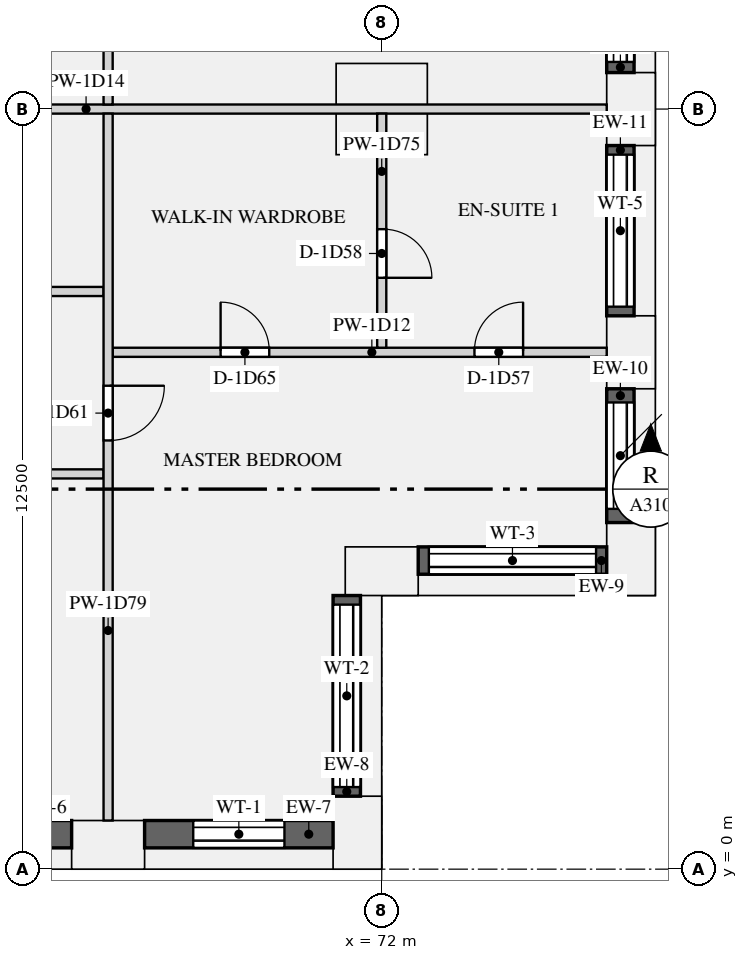
"""IFC4 building model, lengths in metres.
Left out: names, types, materials, properties, quantities, classifications, styles, units other than length and angle.
Written with IfcOpenShell. Run it as: python <this file> out.ifc"""

import sys

from ifc_helpers import new_model, si_unit, direction, frame, frame_2d, origin, origin_2d, place, context, subcontext, project, spatial, rectangle, extrude, element, fill, save


model = new_model("IFC4")
c1 = context("Model", 3, precision=1e-05, world=origin(), true_north=direction((0.0, 1.0)))
c2 = subcontext(c1, "Body", "Model", "MODEL_VIEW")
j1 = project(units=[si_unit("LENGTHUNIT", "METRE"), si_unit("PLANEANGLEUNIT", "RADIAN")], contexts=[c1])
p1 = place(None, origin())
s1 = spatial("IfcSite", under=j1, at=p1, CompositionType="ELEMENT")
p2 = place(p1, origin())
s2 = spatial("IfcBuilding", under=s1, at=p2, CompositionType="ELEMENT")
p3 = place(p2, frame((0.0, 0.0, 47.85)))
s3 = spatial("IfcBuildingStorey", under=s2, at=p3, CompositionType="ELEMENT", Elevation=47.85)
for number, where, z_axis, x_axis in (
    (1, (67.5, 0.4, 0.0), (0.0, 0.0, 1.0), (1.0, 0.0, 0.0)),
    (2, (71.6, 0.6, 0.0), (0.0, 0.0, 1.0), (0.0, 1.0, 0.0)),
    (3, (72.0, 4.9, 0.0), (0.0, 0.0, 1.0), (1.0, 0.0, 0.0)),
    (4, (76.1, 5.1, 0.0), (0.0, 0.0, 1.0), (0.0, 1.0, 0.0)),
    (5, (76.1, 8.5, 0.0), (0.0, 0.0, 1.0), (0.0, 1.0, 0.0)),
    (6, (76.1, 12.5, 0.0), (0.0, 0.0, 1.0), (0.0, 1.0, 0.0)),
):
    element("IfcColumn", number, at=place(p3, frame(where, z_axis=z_axis, x_axis=x_axis)), inside=s3, PredefinedType="USERDEFINED", context=c2, shape_type="SweptSolid", body=[
        extrude(rectangle(XDim=1.2, YDim=0.8, at=origin_2d()), origin(), (0.0, 0.0, 1.0), 3.15),
    ])
p4 = place(p3, frame((72.0, 12.5, 0.0), z_axis=(0.0, 0.0, 1.0), x_axis=(1.0, 0.0, 0.0)))
e7 = element("IfcColumn", 7, at=p4, inside=s3, PredefinedType="COLUMN", context=c2, shape_type="SweptSolid", body=[
    extrude(rectangle(XDim=1.5, YDim=1.5, at=origin_2d()), origin(), (0.0, 0.0, 1.0), 3.15),
])
p5 = place(p3, frame((63.6, 0.575, 0.9), z_axis=(0.0, 0.0, 1.0), x_axis=(1.0, 0.0, 0.0)))
e8 = element("IfcWall", 8, at=p5, inside=s3, PredefinedType="SOLIDWALL", context=c2, shape_type="SweptSolid", body=[
    extrude(rectangle(XDim=3.3, YDim=0.45, at=frame_2d((1.65, 0.0))), origin(), (0.0, 0.0, 1.0), 1.93),
])
p6 = place(p5, frame((0.9, 0.0, 0.15)))
e9 = element("IfcOpeningElement", 9, at=p6, cuts=e8, PredefinedType="OPENING", context=c2, shape_type="SweptSolid", body=[
    extrude(rectangle(XDim=1.5, YDim=1.5, at=frame_2d((0.75, 0.75))), frame((0.0, 0.235, 0.0), z_axis=(0.0, -1.0, 0.0), x_axis=(1.0, 0.0, 0.0)), (0.0, 0.0, 1.0), 0.47),
])
p7 = place(p3, frame((68.1, 0.575, 0.9), z_axis=(0.0, 0.0, 1.0), x_axis=(1.0, 0.0, 0.0)))
e10 = element("IfcWall", 10, at=p7, inside=s3, PredefinedType="SOLIDWALL", context=c2, shape_type="SweptSolid", body=[
    extrude(rectangle(XDim=3.1, YDim=0.45, at=frame_2d((1.55, 0.0))), origin(), (0.0, 0.0, 1.0), 1.93),
])
p8 = place(p7, frame((0.8, 0.0, 0.15)))
e11 = element("IfcOpeningElement", 11, at=p8, cuts=e10, PredefinedType="OPENING", context=c2, shape_type="SweptSolid", body=[
    extrude(rectangle(XDim=1.5, YDim=1.5, at=frame_2d((0.75, 0.75))), frame((0.0, 0.235, 0.0), z_axis=(0.0, -1.0, 0.0), x_axis=(1.0, 0.0, 0.0)), (0.0, 0.0, 1.0), 0.47),
])
p9 = place(p3, frame((71.425, 1.2, 0.9), z_axis=(0.0, 0.0, 1.0), x_axis=(0.0, 1.0, 0.0)))
e12 = element("IfcWall", 12, at=p9, inside=s3, PredefinedType="SOLIDWALL", context=c2, shape_type="SweptSolid", body=[
    extrude(rectangle(XDim=3.3, YDim=0.45, at=frame_2d((1.65, 0.0))), origin(), (0.0, 0.0, 1.0), 1.93),
])
p10 = place(p9, frame((0.15, 0.0, 0.15)))
e13 = element("IfcOpeningElement", 13, at=p10, cuts=e12, PredefinedType="OPENING", context=c2, shape_type="SweptSolid", body=[
    extrude(rectangle(XDim=3.0, YDim=1.5, at=frame_2d((1.5, 0.75))), frame((0.0, 0.235, 0.0), z_axis=(0.0, -1.0, 0.0), x_axis=(1.0, 0.0, 0.0)), (0.0, 0.0, 1.0), 0.47),
])
p11 = place(p3, frame((72.6, 5.075, 0.9), z_axis=(0.0, 0.0, 1.0), x_axis=(1.0, 0.0, 0.0)))
e14 = element("IfcWall", 14, at=p11, inside=s3, PredefinedType="SOLIDWALL", context=c2, shape_type="SweptSolid", body=[
    extrude(rectangle(XDim=3.1, YDim=0.45, at=frame_2d((1.55, 0.0))), origin(), (0.0, 0.0, 1.0), 1.93),
])
p12 = place(p11, frame((0.175, 0.0, 0.15)))
e15 = element("IfcOpeningElement", 15, at=p12, cuts=e14, PredefinedType="OPENING", context=c2, shape_type="SweptSolid", body=[
    extrude(rectangle(XDim=2.75, YDim=1.5, at=frame_2d((1.375, 0.75))), frame((0.0, 0.235, 0.0), z_axis=(0.0, -1.0, 0.0), x_axis=(1.0, 0.0, 0.0)), (0.0, 0.0, 1.0), 0.47),
])
p13 = place(p3, frame((75.925, 5.7, 0.9), z_axis=(0.0, 0.0, 1.0), x_axis=(0.0, 1.0, 0.0)))
e16 = element("IfcWall", 16, at=p13, inside=s3, PredefinedType="SOLIDWALL", context=c2, shape_type="SweptSolid", body=[
    extrude(rectangle(XDim=2.2, YDim=0.45, at=frame_2d((1.1, 0.0))), origin(), (0.0, 0.0, 1.0), 1.93),
])
p14 = place(p13, frame((0.225, 0.0, 0.15)))
e17 = element("IfcOpeningElement", 17, at=p14, cuts=e16, PredefinedType="OPENING", context=c2, shape_type="SweptSolid", body=[
    extrude(rectangle(XDim=1.75, YDim=1.5, at=frame_2d((0.875, 0.75))), frame((0.0, 0.235, 0.0), z_axis=(0.0, -1.0, 0.0), x_axis=(1.0, 0.0, 0.0)), (0.0, 0.0, 1.0), 0.47),
])
p15 = place(p3, frame((75.925, 9.1, 0.9), z_axis=(0.0, 0.0, 1.0), x_axis=(0.0, 1.0, 0.0)))
e18 = element("IfcWall", 18, at=p15, inside=s3, PredefinedType="SOLIDWALL", context=c2, shape_type="SweptSolid", body=[
    extrude(rectangle(XDim=2.8, YDim=0.45, at=frame_2d((1.4, 0.0))), origin(), (0.0, 0.0, 1.0), 1.93),
])
p16 = place(p15, frame((0.15, 0.0, 0.15)))
e19 = element("IfcOpeningElement", 19, at=p16, cuts=e18, PredefinedType="OPENING", context=c2, shape_type="SweptSolid", body=[
    extrude(rectangle(XDim=2.5, YDim=1.5, at=frame_2d((1.25, 0.75))), frame((0.0, 0.235, 0.0), z_axis=(0.0, -1.0, 0.0), x_axis=(1.0, 0.0, 0.0)), (0.0, 0.0, 1.0), 0.47),
])
p17 = place(p3, frame((75.925, 13.1, 0.9), z_axis=(0.0, 0.0, 1.0), x_axis=(0.0, 1.0, 0.0)))
e20 = element("IfcWall", 20, at=p17, inside=s3, PredefinedType="SOLIDWALL", context=c2, shape_type="SweptSolid", body=[
    extrude(rectangle(XDim=2.6, YDim=0.45, at=frame_2d((1.3, 0.0))), origin(), (0.0, 0.0, 1.0), 1.93),
])
p18 = place(p17, frame((0.175, 0.0, 0.15)))
e21 = element("IfcOpeningElement", 21, at=p18, cuts=e20, PredefinedType="OPENING", context=c2, shape_type="SweptSolid", body=[
    extrude(rectangle(XDim=2.25, YDim=1.5, at=frame_2d((1.125, 0.75))), frame((0.0, 0.235, 0.0), z_axis=(0.0, -1.0, 0.0), x_axis=(1.0, 0.0, 0.0)), (0.0, 0.0, 1.0), 0.47),
])
p19 = place(p3, frame((67.575, 8.5, 0.0), z_axis=(0.0, 0.0, 1.0), x_axis=(1.0, 0.0, 0.0)))
e22 = element("IfcWall", 22, at=p19, inside=s3, PredefinedType="PARTITIONING", context=c2, shape_type="SweptSolid", body=[
    extrude(rectangle(XDim=8.125, YDim=0.15, at=frame_2d((4.062, 0.0))), origin(), (0.0, 0.0, 1.0), 2.83),
])
p20 = place(p19, frame((5.95, 0.0, 0.0)))
e23 = element("IfcOpeningElement", 23, at=p20, cuts=e22, PredefinedType="OPENING", context=c2, shape_type="SweptSolid", body=[
    extrude(rectangle(XDim=0.8, YDim=2.1, at=frame_2d((0.4, 1.05))), frame((0.0, 0.085, 0.0), z_axis=(0.0, -1.0, 0.0), x_axis=(1.0, 0.0, 0.0)), (0.0, 0.0, 1.0), 0.17),
])
p21 = place(p19, frame((1.775, 0.0, 0.0)))
e24 = element("IfcOpeningElement", 24, at=p21, cuts=e22, PredefinedType="OPENING", context=c2, shape_type="SweptSolid", body=[
    extrude(rectangle(XDim=0.8, YDim=2.1, at=frame_2d((0.4, 1.05))), frame((0.0, 0.085, 0.0), z_axis=(0.0, -1.0, 0.0), x_axis=(1.0, 0.0, 0.0)), (0.0, 0.0, 1.0), 0.17),
])
p22 = place(p3, frame((58.575, 12.5, 0.0), z_axis=(0.0, 0.0, 1.0), x_axis=(1.0, 0.0, 0.0)))
e25 = element("IfcWall", 25, at=p22, inside=s3, PredefinedType="PARTITIONING", context=c2, shape_type="SweptSolid", body=[
    extrude(rectangle(XDim=17.125, YDim=0.15, at=frame_2d((8.562, 0.0))), origin(), (0.0, 0.0, 1.0), 2.83),
])
p23 = place(p3, frame((54.0, 6.5, 0.0), z_axis=(0.0, 0.0, 1.0), x_axis=(1.0, 0.0, 0.0)))
e26 = element("IfcWall", 26, at=p23, inside=s3, PredefinedType="PARTITIONING", context=c2, shape_type="SweptSolid", body=[
    extrude(rectangle(XDim=13.425, YDim=0.15, at=frame_2d((6.712, 0.0))), origin(), (0.0, 0.0, 1.0), 2.83),
])
p24 = place(p23, frame((1.8, 0.0, 0.0)))
e27 = element("IfcOpeningElement", 27, at=p24, cuts=e26, PredefinedType="OPENING", context=c2, shape_type="SweptSolid", body=[
    extrude(rectangle(XDim=0.9, YDim=2.1, at=frame_2d((0.45, 1.05))), frame((0.0, 0.085, 0.0), z_axis=(0.0, -1.0, 0.0), x_axis=(1.0, 0.0, 0.0)), (0.0, 0.0, 1.0), 0.17),
])
p25 = place(p23, frame((6.3, 0.0, 0.0)))
e28 = element("IfcOpeningElement", 28, at=p25, cuts=e26, PredefinedType="OPENING", context=c2, shape_type="SweptSolid", body=[
    extrude(rectangle(XDim=0.9, YDim=2.1, at=frame_2d((0.45, 1.05))), frame((0.0, 0.085, 0.0), z_axis=(0.0, -1.0, 0.0), x_axis=(1.0, 0.0, 0.0)), (0.0, 0.0, 1.0), 0.17),
])
p26 = place(p23, frame((10.8, 0.0, 0.0)))
e29 = element("IfcOpeningElement", 29, at=p26, cuts=e26, PredefinedType="OPENING", context=c2, shape_type="SweptSolid", body=[
    extrude(rectangle(XDim=0.9, YDim=2.1, at=frame_2d((0.45, 1.05))), frame((0.0, 0.085, 0.0), z_axis=(0.0, -1.0, 0.0), x_axis=(1.0, 0.0, 0.0)), (0.0, 0.0, 1.0), 0.17),
])
p27 = place(p3, frame((58.425, 9.5, 0.0), z_axis=(0.0, 0.0, 1.0), x_axis=(1.0, 0.0, 0.0)))
e30 = element("IfcWall", 30, at=p27, inside=s3, PredefinedType="PARTITIONING", context=c2, shape_type="SweptSolid", body=[
    extrude(rectangle(XDim=9.0, YDim=0.15, at=frame_2d((4.5, 0.0))), origin(), (0.0, 0.0, 1.0), 2.83),
])
p28 = place(p27, frame((6.375, 0.0, 0.0)))
e31 = element("IfcOpeningElement", 31, at=p28, cuts=e30, PredefinedType="OPENING", context=c2, shape_type="SweptSolid", body=[
    extrude(rectangle(XDim=0.9, YDim=2.1, at=frame_2d((0.45, 1.05))), frame((0.0, 0.085, 0.0), z_axis=(0.0, -1.0, 0.0), x_axis=(1.0, 0.0, 0.0)), (0.0, 0.0, 1.0), 0.17),
])
p29 = place(p27, frame((1.875, 0.0, 0.0)))
e32 = element("IfcOpeningElement", 32, at=p29, cuts=e30, PredefinedType="OPENING", context=c2, shape_type="SweptSolid", body=[
    extrude(rectangle(XDim=0.9, YDim=2.1, at=frame_2d((0.45, 1.05))), frame((0.0, 0.085, 0.0), z_axis=(0.0, -1.0, 0.0), x_axis=(1.0, 0.0, 0.0)), (0.0, 0.0, 1.0), 0.17),
])
p30 = place(p3, frame((72.0, 8.575, 0.0), z_axis=(0.0, 0.0, 1.0), x_axis=(0.0, 1.0, 0.0)))
e33 = element("IfcWall", 33, at=p30, inside=s3, PredefinedType="PARTITIONING", context=c2, shape_type="SweptSolid", body=[
    extrude(rectangle(XDim=3.85, YDim=0.15, at=frame_2d((1.925, 0.0))), origin(), (0.0, 0.0, 1.0), 2.83),
])
p31 = place(p30, frame((1.15, 0.0, 0.0)))
e34 = element("IfcOpeningElement", 34, at=p31, cuts=e33, PredefinedType="OPENING", context=c2, shape_type="SweptSolid", body=[
    extrude(rectangle(XDim=0.8, YDim=2.1, at=frame_2d((0.4, 1.05))), frame((0.0, 0.085, 0.0), z_axis=(0.0, -1.0, 0.0), x_axis=(1.0, 0.0, 0.0)), (0.0, 0.0, 1.0), 0.17),
])
p32 = place(p3, frame((67.5, 0.8, 0.0), z_axis=(0.0, 0.0, 1.0), x_axis=(0.0, 1.0, 0.0)))
e35 = element("IfcWall", 35, at=p32, inside=s3, PredefinedType="PARTITIONING", context=c2, shape_type="SweptSolid", body=[
    extrude(rectangle(XDim=11.625, YDim=0.15, at=frame_2d((5.812, 0.0))), origin(), (0.0, 0.0, 1.0), 2.83),
])
p33 = place(p32, frame((6.25, 0.0, 0.0)))
e36 = element("IfcOpeningElement", 36, at=p33, cuts=e35, PredefinedType="OPENING", context=c2, shape_type="SweptSolid", body=[
    extrude(rectangle(XDim=0.9, YDim=2.1, at=frame_2d((0.45, 1.05))), frame((0.0, 0.085, 0.0), z_axis=(0.0, -1.0, 0.0), x_axis=(1.0, 0.0, 0.0)), (0.0, 0.0, 1.0), 0.17),
])
p34 = place(p3, frame((67.5, 12.575, 0.0), z_axis=(0.0, 0.0, 1.0), x_axis=(0.0, 1.0, 0.0)))
e37 = element("IfcWall", 37, at=p34, inside=s3, PredefinedType="PARTITIONING", context=c2, shape_type="SweptSolid", body=[
    extrude(rectangle(XDim=11.35, YDim=0.15, at=frame_2d((5.675, 0.0))), origin(), (0.0, 0.0, 1.0), 2.83),
])
p35 = place(p34, frame((7.225, 0.0, 0.0)))
e38 = element("IfcOpeningElement", 38, at=p35, cuts=e37, PredefinedType="OPENING", context=c2, shape_type="SweptSolid", body=[
    extrude(rectangle(XDim=0.9, YDim=2.1, at=frame_2d((0.45, 1.05))), frame((0.0, 0.085, 0.0), z_axis=(0.0, -1.0, 0.0), x_axis=(1.0, 0.0, 0.0)), (0.0, 0.0, 1.0), 0.17),
])
p36 = place(p8, origin())
e39 = element("IfcWindow", 39, at=p36, inside=s3, PartitioningType="SINGLE_PANEL", PredefinedType="WINDOW", context=c2, shape_type="SweptSolid", body=[
    extrude(rectangle(XDim=1.5, YDim=1.5, at=frame_2d((0.75, 0.75))), frame((0.0, -0.065, 0.0), z_axis=(0.0, -1.0, 0.0), x_axis=(1.0, 0.0, 0.0)), (0.0, 0.0, 1.0), 0.06),
])
fill(e11, e39)
p37 = place(p10, origin())
e40 = element("IfcWindow", 40, at=p37, inside=s3, PartitioningType="SINGLE_PANEL", PredefinedType="WINDOW", context=c2, shape_type="SweptSolid", body=[
    extrude(rectangle(XDim=3.0, YDim=1.5, at=frame_2d((1.5, 0.75))), frame((0.0, -0.065, 0.0), z_axis=(0.0, -1.0, 0.0), x_axis=(1.0, 0.0, 0.0)), (0.0, 0.0, 1.0), 0.06),
])
fill(e13, e40)
p38 = place(p12, origin())
e41 = element("IfcWindow", 41, at=p38, inside=s3, PartitioningType="SINGLE_PANEL", PredefinedType="WINDOW", context=c2, shape_type="SweptSolid", body=[
    extrude(rectangle(XDim=2.75, YDim=1.5, at=frame_2d((1.375, 0.75))), frame((0.0, -0.065, 0.0), z_axis=(0.0, -1.0, 0.0), x_axis=(1.0, 0.0, 0.0)), (0.0, 0.0, 1.0), 0.06),
])
fill(e15, e41)
p39 = place(p14, origin())
e42 = element("IfcWindow", 42, at=p39, inside=s3, PartitioningType="SINGLE_PANEL", PredefinedType="WINDOW", context=c2, shape_type="SweptSolid", body=[
    extrude(rectangle(XDim=1.75, YDim=1.5, at=frame_2d((0.875, 0.75))), frame((0.0, -0.065, 0.0), z_axis=(0.0, -1.0, 0.0), x_axis=(1.0, 0.0, 0.0)), (0.0, 0.0, 1.0), 0.06),
])
fill(e17, e42)
p40 = place(p16, origin())
e43 = element("IfcWindow", 43, at=p40, inside=s3, PartitioningType="SINGLE_PANEL", PredefinedType="WINDOW", context=c2, shape_type="SweptSolid", body=[
    extrude(rectangle(XDim=2.5, YDim=1.5, at=frame_2d((1.25, 0.75))), frame((0.0, -0.065, 0.0), z_axis=(0.0, -1.0, 0.0), x_axis=(1.0, 0.0, 0.0)), (0.0, 0.0, 1.0), 0.06),
])
fill(e19, e43)
p41 = place(p18, origin())
e44 = element("IfcWindow", 44, at=p41, inside=s3, PartitioningType="SINGLE_PANEL", PredefinedType="WINDOW", context=c2, shape_type="SweptSolid", body=[
    extrude(rectangle(XDim=2.25, YDim=1.5, at=frame_2d((1.125, 0.75))), frame((0.0, -0.065, 0.0), z_axis=(0.0, -1.0, 0.0), x_axis=(1.0, 0.0, 0.0)), (0.0, 0.0, 1.0), 0.06),
])
fill(e21, e44)
p42 = place(p20, origin())
e45 = element("IfcDoor", 45, at=p42, inside=s3, OperationType="SINGLE_SWING_RIGHT", PredefinedType="DOOR", context=c2, shape_type="SweptSolid", body=[
    extrude(rectangle(XDim=0.8, YDim=2.1, at=frame_2d((0.4, 1.05))), frame((0.0, 0.025, 0.0), z_axis=(0.0, -1.0, 0.0), x_axis=(1.0, 0.0, 0.0)), (0.0, 0.0, 1.0), 0.05),
])
fill(e23, e45)
p43 = place(p31, frame((0.8, 0.0, 0.0), z_axis=(0.0, 0.0, 1.0), x_axis=(-1.0, 0.0, 0.0)))
e46 = element("IfcDoor", 46, at=p43, inside=s3, OperationType="SINGLE_SWING_RIGHT", PredefinedType="DOOR", context=c2, shape_type="SweptSolid", body=[
    extrude(rectangle(XDim=0.8, YDim=2.1, at=frame_2d((0.4, 1.05))), frame((0.0, 0.025, 0.0), z_axis=(0.0, -1.0, 0.0), x_axis=(1.0, 0.0, 0.0)), (0.0, 0.0, 1.0), 0.05),
])
fill(e34, e46)
p44 = place(p33, frame((0.9, 0.0, 0.0), z_axis=(0.0, 0.0, 1.0), x_axis=(-1.0, 0.0, 0.0)))
e47 = element("IfcDoor", 47, at=p44, inside=s3, OperationType="SINGLE_SWING_LEFT", PredefinedType="DOOR", context=c2, shape_type="SweptSolid", body=[
    extrude(rectangle(XDim=0.9, YDim=2.1, at=frame_2d((0.45, 1.05))), frame((0.0, 0.025, 0.0), z_axis=(0.0, -1.0, 0.0), x_axis=(1.0, 0.0, 0.0)), (0.0, 0.0, 1.0), 0.05),
])
fill(e36, e47)
p45 = place(p21, origin())
e48 = element("IfcDoor", 48, at=p45, inside=s3, OperationType="SINGLE_SWING_LEFT", PredefinedType="DOOR", context=c2, shape_type="SweptSolid", body=[
    extrude(rectangle(XDim=0.8, YDim=2.1, at=frame_2d((0.4, 1.05))), frame((0.0, 0.025, 0.0), z_axis=(0.0, -1.0, 0.0), x_axis=(1.0, 0.0, 0.0)), (0.0, 0.0, 1.0), 0.05),
])
fill(e24, e48)
save(model, sys.argv[1])
